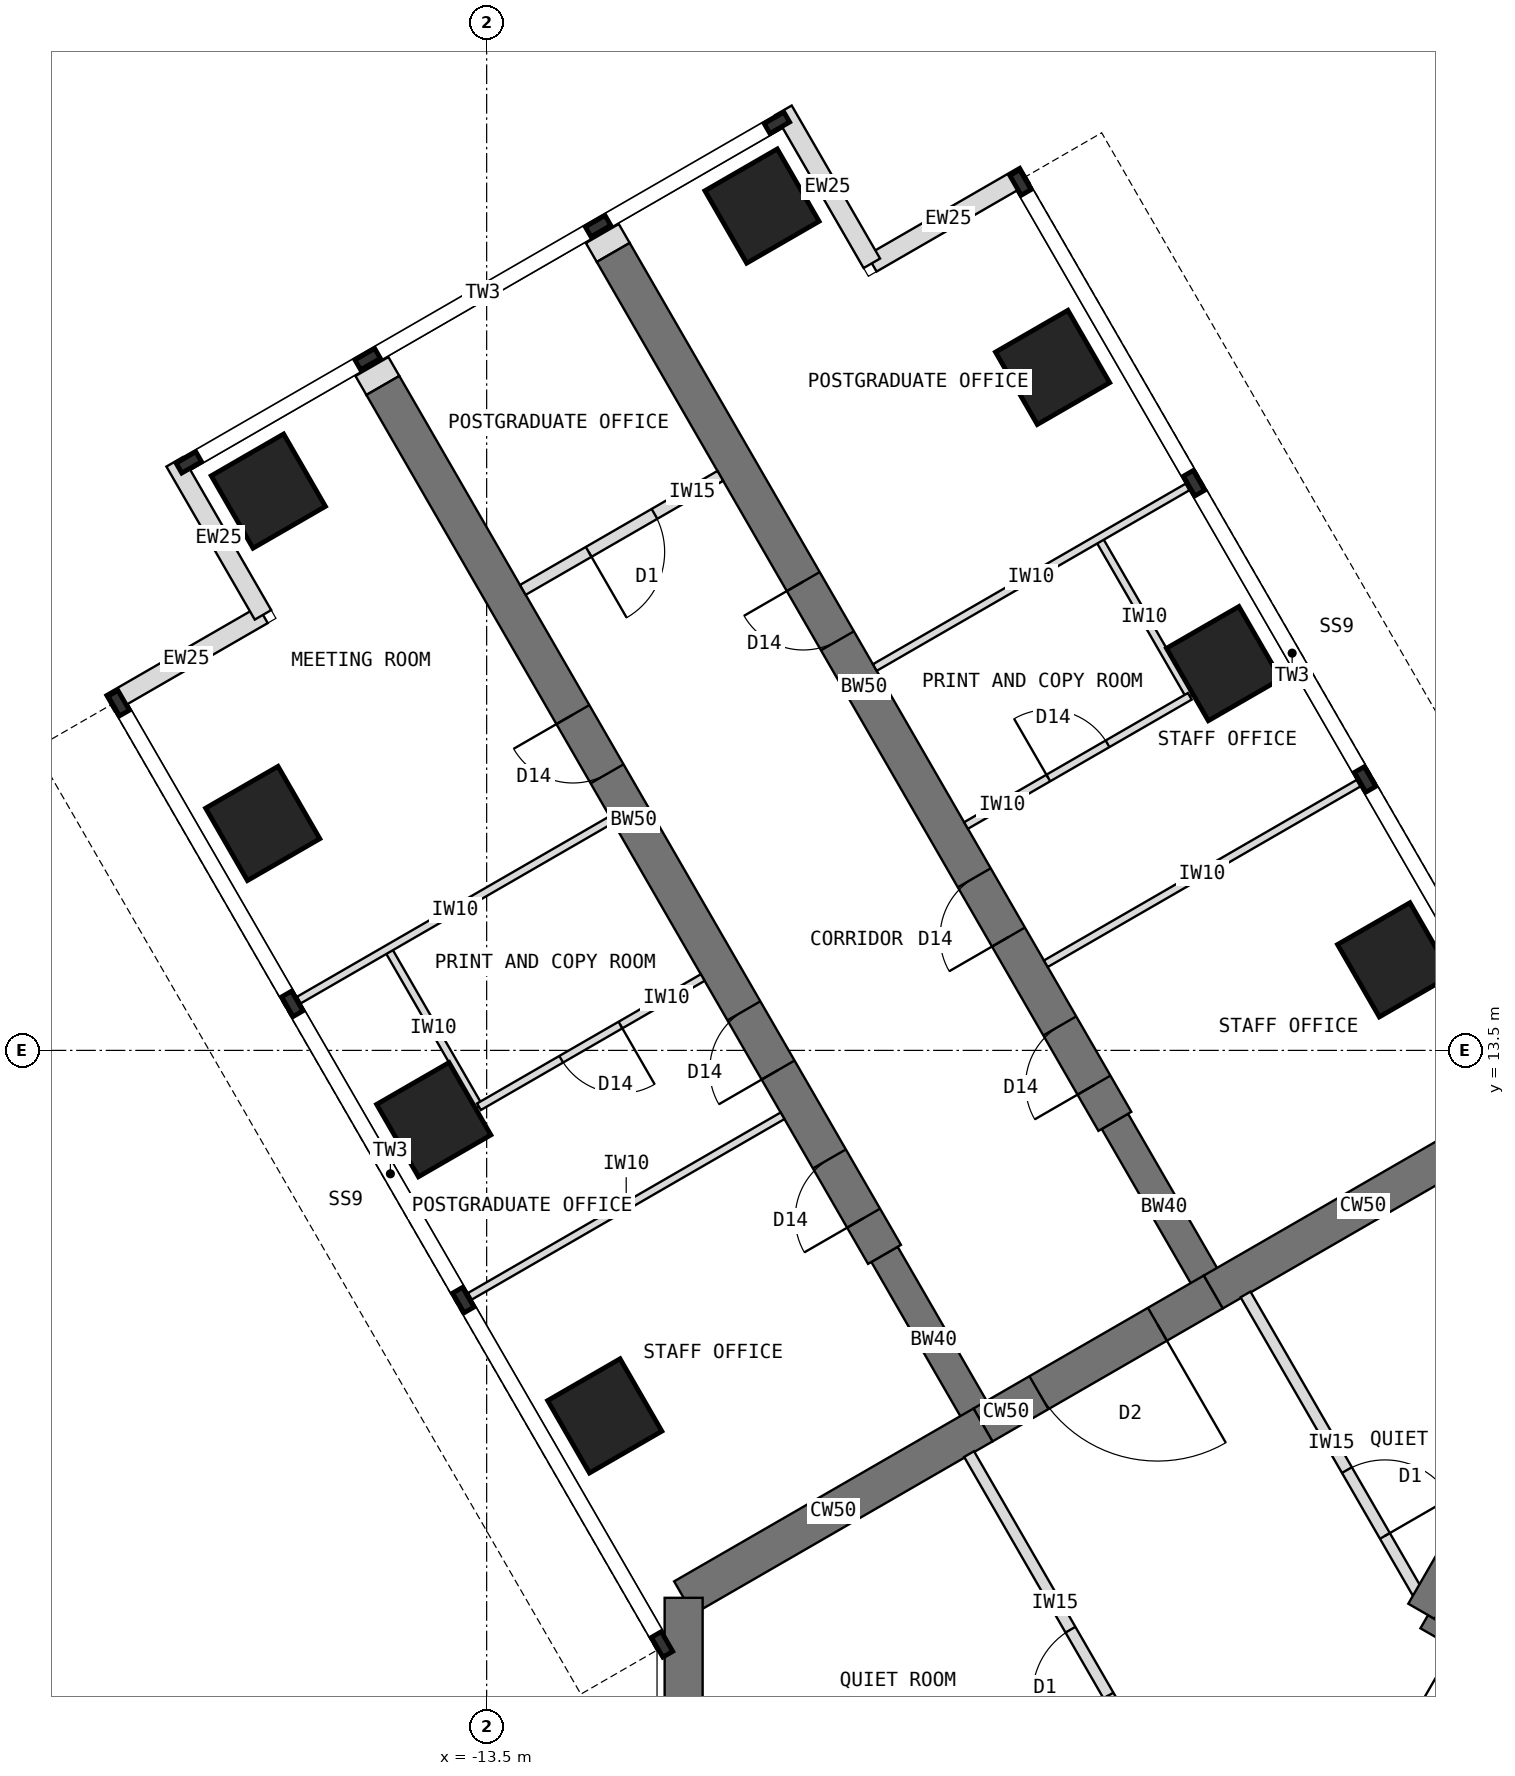
"""IFC4 building model, lengths in metres.
Left out: names, types, materials, properties, quantities, classifications, styles, units other than length and angle.
Written with IfcOpenShell. Run it as: python <this file> out.ifc"""

import sys

from ifc_helpers import new_model, si_unit, direction, frame, frame_2d, origin, origin_2d, place, context, subcontext, project, spatial, rectangle, extrude, element, fill, save


model = new_model("IFC4")
c1 = context("Model", 3, precision=1e-05, world=origin(), true_north=direction((0.0, 1.0)))
c2 = subcontext(c1, "Body", "Model", "MODEL_VIEW")
j1 = project(units=[si_unit("LENGTHUNIT", "METRE"), si_unit("PLANEANGLEUNIT", "RADIAN")], contexts=[c1])
p1 = place(None, origin())
s1 = spatial("IfcSite", under=j1, at=p1, CompositionType="ELEMENT")
p2 = place(p1, origin())
s2 = spatial("IfcBuilding", under=s1, at=p2, CompositionType="ELEMENT")
p3 = place(p2, frame((0.0, 0.0, 234.5)))
s3 = spatial("IfcBuildingStorey", under=s2, at=p3, CompositionType="ELEMENT", Elevation=234.5)
p4 = place(p3, frame((0.0, 12.596, 0.0), z_axis=(0.0, 0.0, 1.0), x_axis=(-0.866011268655, -0.500024481964, 0.0)))
e1 = element("IfcWall", 1, at=p4, inside=s3, PredefinedType="SHEAR", context=c2, shape_type="SweptSolid", body=[
    extrude(rectangle(XDim=4.548, YDim=0.5, at=frame_2d((2.274, 0.0))), origin(), (0.0, 0.0, 1.0), 4.0),
])
p5 = place(p3, frame((-3.939, 10.322, 0.0), z_axis=(0.0, 0.0, 1.0), x_axis=(-0.866019471182, -0.500010275428, 0.0)))
e2 = element("IfcWall", 2, at=p5, inside=s3, PredefinedType="SHEAR", context=c2, shape_type="SweptSolid", body=[
    extrude(rectangle(XDim=3.5, YDim=0.5, at=frame_2d((1.75, 0.0))), origin(), (0.0, 0.0, 1.0), 4.0),
])
p6 = place(p5, frame((0.85, 0.0, 0.0)))
e3 = element("IfcOpeningElement", 3, at=p6, cuts=e2, PredefinedType="OPENING", context=c2, shape_type="SweptSolid", body=[
    extrude(rectangle(XDim=1.8, YDim=2.1, at=frame_2d((0.9, 1.05))), frame((0.0, 0.26, 0.0), z_axis=(0.0, -1.0, 0.0), x_axis=(1.0, 0.0, 0.0)), (0.0, 0.0, 1.0), 0.52),
])
p7 = place(p3, frame((-6.97, 8.572, 0.0), z_axis=(0.0, 0.0, 1.0), x_axis=(-0.866034513004, -0.499984222037, 0.0)))
e4 = element("IfcWall", 4, at=p7, inside=s3, PredefinedType="SHEAR", context=c2, shape_type="SweptSolid", body=[
    extrude(rectangle(XDim=4.548, YDim=0.5, at=frame_2d((2.274, 0.0))), origin(), (0.0, 0.0, 1.0), 4.0),
])
p8 = place(p3, frame((-10.908, 6.298, 0.0), z_axis=(0.0, 0.0, 1.0), x_axis=(0.0, -1.0, 0.0)))
e5 = element("IfcWall", 5, at=p8, inside=s3, PredefinedType="SHEAR", context=c2, shape_type="SweptSolid", body=[
    extrude(rectangle(XDim=12.596, YDim=0.5, at=frame_2d((6.298, 0.0))), origin(), (0.0, 0.0, 1.0), 4.0),
])
p9 = place(p3, frame((-6.97, 8.572, 0.0), z_axis=(0.0, 0.0, 1.0), x_axis=(-0.499988811324, 0.866031863473, 0.0)))
e6 = element("IfcWall", 6, at=p9, inside=s3, PredefinedType="SHEAR", context=c2, shape_type="SweptSolid", body=[
    extrude(rectangle(XDim=2.592, YDim=0.4, at=frame_2d((1.296, 0.0))), origin(), (0.0, 0.0, 1.0), 4.0),
])
p10 = place(p3, frame((-8.266, 10.816, 0.0), z_axis=(0.0, 0.0, 1.0), x_axis=(-0.499996231654, 0.866027579429, 0.0)))
e7 = element("IfcWall", 7, at=p10, inside=s3, PredefinedType="SHEAR", context=c2, shape_type="SweptSolid", body=[
    extrude(rectangle(XDim=13.2, YDim=0.5, at=frame_2d((6.6, 0.0))), origin(), (0.0, 0.0, 1.0), 4.0),
])
p11 = place(p10, frame((0.55, 0.0, 0.0)))
e8 = element("IfcOpeningElement", 8, at=p11, cuts=e7, PredefinedType="OPENING", context=c2, shape_type="SweptSolid", body=[
    extrude(rectangle(XDim=0.9, YDim=2.1, at=frame_2d((0.45, 1.05))), frame((0.0, 0.26, 0.0), z_axis=(0.0, -1.0, 0.0), x_axis=(1.0, 0.0, 0.0)), (0.0, 0.0, 1.0), 0.52),
])
p12 = place(p10, frame((2.8, 0.0, 0.0)))
e9 = element("IfcOpeningElement", 9, at=p12, cuts=e7, PredefinedType="OPENING", context=c2, shape_type="SweptSolid", body=[
    extrude(rectangle(XDim=0.9, YDim=2.1, at=frame_2d((0.45, 1.05))), frame((0.0, 0.26, 0.0), z_axis=(0.0, -1.0, 0.0), x_axis=(1.0, 0.0, 0.0)), (0.0, 0.0, 1.0), 0.52),
])
p13 = place(p10, frame((7.3, 0.0, 0.0)))
e10 = element("IfcOpeningElement", 10, at=p13, cuts=e7, PredefinedType="OPENING", context=c2, shape_type="SweptSolid", body=[
    extrude(rectangle(XDim=0.9, YDim=2.1, at=frame_2d((0.45, 1.05))), frame((0.0, 0.26, 0.0), z_axis=(0.0, -1.0, 0.0), x_axis=(1.0, 0.0, 0.0)), (0.0, 0.0, 1.0), 0.52),
])
p14 = place(p3, frame((-3.939, 10.322, 0.0), z_axis=(0.0, 0.0, 1.0), x_axis=(-0.499918158782, 0.866072649678, 0.0)))
e11 = element("IfcWall", 11, at=p14, inside=s3, PredefinedType="SHEAR", context=c2, shape_type="SweptSolid", body=[
    extrude(rectangle(XDim=2.592, YDim=0.4, at=frame_2d((1.296, 0.0))), origin(), (0.0, 0.0, 1.0), 4.0),
])
p15 = place(p3, frame((-5.234, 12.566, 0.0), z_axis=(0.0, 0.0, 1.0), x_axis=(-0.500010103361, 0.866019570528, 0.0)))
e12 = element("IfcWall", 12, at=p15, inside=s3, PredefinedType="SHEAR", context=c2, shape_type="SweptSolid", body=[
    extrude(rectangle(XDim=13.2, YDim=0.5, at=frame_2d((6.6, 0.0))), origin(), (0.0, 0.0, 1.0), 4.0),
])
p16 = place(p15, frame((0.55, 0.0, 0.0)))
e13 = element("IfcOpeningElement", 13, at=p16, cuts=e12, PredefinedType="OPENING", context=c2, shape_type="SweptSolid", body=[
    extrude(rectangle(XDim=0.9, YDim=2.1, at=frame_2d((0.45, 1.05))), frame((0.0, 0.26, 0.0), z_axis=(0.0, -1.0, 0.0), x_axis=(1.0, 0.0, 0.0)), (0.0, 0.0, 1.0), 0.52),
])
p17 = place(p15, frame((2.8, 0.0, 0.0)))
e14 = element("IfcOpeningElement", 14, at=p17, cuts=e12, PredefinedType="OPENING", context=c2, shape_type="SweptSolid", body=[
    extrude(rectangle(XDim=0.9, YDim=2.1, at=frame_2d((0.45, 1.05))), frame((0.0, 0.26, 0.0), z_axis=(0.0, -1.0, 0.0), x_axis=(1.0, 0.0, 0.0)), (0.0, 0.0, 1.0), 0.52),
])
p18 = place(p15, frame((7.3, 0.0, 0.0)))
e15 = element("IfcOpeningElement", 15, at=p18, cuts=e12, PredefinedType="OPENING", context=c2, shape_type="SweptSolid", body=[
    extrude(rectangle(XDim=0.9, YDim=2.1, at=frame_2d((0.45, 1.05))), frame((0.0, 0.26, 0.0), z_axis=(0.0, -1.0, 0.0), x_axis=(1.0, 0.0, 0.0)), (0.0, 0.0, 1.0), 0.52),
])
for number, where, z_axis, x_axis in (
    (16, (-11.946, 8.691, 0.0), (0.0, 0.0, 1.0), (0.866, 0.5, 0.0)),
    (17, (-1.554, 14.691, 0.0), (0.0, 0.0, 1.0), (0.866, 0.5, 0.0)),
    (18, (-14.196, 12.588, 0.0), (0.0, 0.0, 1.0), (0.866, 0.5, 0.0)),
    (19, (-3.804, 18.588, 0.0), (0.0, 0.0, 1.0), (0.866, 0.5, 0.0)),
    (20, (-16.446, 16.486, 0.0), (0.0, 0.0, 1.0), (0.866, 0.5, 0.0)),
    (21, (-6.054, 22.486, 0.0), (0.0, 0.0, 1.0), (0.866, 0.5, 0.0)),
    (22, (-16.373, 20.858, 0.0), (0.0, 0.0, 1.0), (0.866, 0.5, 0.0)),
    (23, (-9.877, 24.608, 0.0), (0.0, 0.0, 1.0), (0.866, 0.5, 0.0)),
):
    element("IfcColumn", number, at=place(p3, frame(where, z_axis=z_axis, x_axis=x_axis)), inside=s3, PredefinedType="COLUMN", context=c2, shape_type="SweptSolid", body=[
        extrude(rectangle(XDim=1.1, YDim=1.1, at=origin_2d()), origin(), (0.0, 0.0, 1.0), 4.0),
    ])
for number, where, z_axis, x_axis in (
    (24, (-18.456, 18.067, 0.0), (0.0, 0.0, 1.0), (0.866, 0.5, 0.0)),
    (25, (-16.443, 19.23, 0.0), (0.0, 0.0, 1.0), (-0.5, 0.866, 0.0)),
    (26, (-6.419, 25.017, 0.0), (0.0, 0.0, 1.0), (-0.866, -0.5, 0.0)),
    (27, (-8.432, 23.855, 0.0), (0.0, 0.0, 1.0), (-0.5, 0.866, 0.0)),
):
    element("IfcWall", number, at=place(p3, frame(where, z_axis=z_axis, x_axis=x_axis)), inside=s3, PredefinedType="STANDARD", context=c2, shape_type="SweptSolid", body=[
        extrude(rectangle(XDim=2.325, YDim=0.25, at=frame_2d((1.163, 0.0))), origin(), (0.0, 0.0, 1.0), 3.7),
    ])
for number, where, z_axis, x_axis in (
    (28, (-14.865, 22.248, 0.0), (0.0, 0.0, 1.0), (-0.5, 0.866, 0.0)),
    (29, (-11.834, 23.998, 0.0), (0.0, 0.0, 1.0), (-0.5, 0.866, 0.0)),
):
    element("IfcWall", number, at=place(p3, frame(where, z_axis=z_axis, x_axis=x_axis)), inside=s3, PredefinedType="PARTITIONING", context=c2, shape_type="SweptSolid", body=[
        extrude(rectangle(XDim=0.288, YDim=0.5, at=frame_2d((0.144, 0.0))), origin(), (0.0, 0.0, 1.0), 3.7),
    ])
p19 = place(p3, frame((5.764, 1.984, 0.0), z_axis=(0.0, 0.0, 1.0), x_axis=(-0.866026010844, 0.49999894854, 0.0)))
e30 = element("IfcWall", 30, at=p19, inside=s3, PredefinedType="SHEAR", context=c2, shape_type="SweptSolid", body=[
    extrude(rectangle(XDim=8.0, YDim=0.2, at=frame_2d((4.0, 0.0))), origin(), (0.0, 0.0, 1.0), 4.0),
])
p20 = place(p19, frame((6.3, 0.0, 0.0)))
e31 = element("IfcOpeningElement", 31, at=p20, cuts=e30, PredefinedType="OPENING", context=c2, shape_type="SweptSolid", body=[
    extrude(rectangle(XDim=1.2, YDim=2.1, at=frame_2d((0.6, 1.05))), frame((0.0, 0.11, 0.0), z_axis=(0.0, -1.0, 0.0), x_axis=(1.0, 0.0, 0.0)), (0.0, 0.0, 1.0), 0.22),
])
p21 = place(p3, frame((-1.201, 6.12, 0.0), z_axis=(0.0, 0.0, 1.0), x_axis=(0.500021575205, 0.866012946976, 0.0)))
e32 = element("IfcWall", 32, at=p21, inside=s3, PredefinedType="SHEAR", context=c2, shape_type="SweptSolid", body=[
    extrude(rectangle(XDim=5.958, YDim=0.4, at=frame_2d((2.979, 0.0))), origin(), (0.0, 0.0, 1.0), 4.0),
])
for number, where, z_axis, x_axis in (
    (33, (-9.607, 12.64, 0.0), (0.0, 0.0, 1.0), (-0.866, -0.5, 0.0)),
    (34, (-11.857, 16.537, 0.0), (0.0, 0.0, 1.0), (-0.866, -0.5, 0.0)),
):
    element("IfcWall", number, at=place(p3, frame(where, z_axis=z_axis, x_axis=x_axis)), inside=s3, PredefinedType="PARTITIONING", context=c2, shape_type="SweptSolid", body=[
        extrude(rectangle(XDim=4.75, YDim=0.1, at=frame_2d((2.375, 0.0))), origin(), (0.0, 0.0, 1.0), 3.7),
    ])
p22 = place(p3, frame((-13.602, 12.759, 0.0), z_axis=(0.0, 0.0, 1.0), x_axis=(-0.500001309137, 0.866024647952, 0.0)))
e35 = element("IfcWall", 35, at=p22, inside=s3, PredefinedType="PARTITIONING", context=c2, shape_type="SweptSolid", body=[
    extrude(rectangle(XDim=2.4, YDim=0.1, at=frame_2d((1.2, 0.0))), origin(), (0.0, 0.0, 1.0), 3.7),
])
p23 = place(p3, frame((-10.657, 14.458, 0.0), z_axis=(0.0, 0.0, 1.0), x_axis=(-0.866038511948, -0.499977295307, 0.0)))
e36 = element("IfcWall", 36, at=p23, inside=s3, PredefinedType="PARTITIONING", context=c2, shape_type="SweptSolid", body=[
    extrude(rectangle(XDim=3.4, YDim=0.1, at=frame_2d((1.7, 0.0))), origin(), (0.0, 0.0, 1.0), 3.7),
])
p24 = place(p23, frame((1.25, 0.0, 0.0)))
e37 = element("IfcOpeningElement", 37, at=p24, cuts=e36, PredefinedType="OPENING", context=c2, shape_type="SweptSolid", body=[
    extrude(rectangle(XDim=0.9, YDim=2.1, at=frame_2d((0.45, 1.05))), frame((0.0, 0.06, 0.0), z_axis=(0.0, -1.0, 0.0), x_axis=(1.0, 0.0, 0.0)), (0.0, 0.0, 1.0), 0.12),
])
for number, where, z_axis, x_axis in (
    (38, (-6.143, 14.64, 0.0), (0.0, 0.0, 1.0), (0.866, 0.5, 0.0)),
    (39, (-8.393, 18.537, 0.0), (0.0, 0.0, 1.0), (0.866, 0.5, 0.0)),
):
    element("IfcWall", number, at=place(p3, frame(where, z_axis=z_axis, x_axis=x_axis)), inside=s3, PredefinedType="PARTITIONING", context=c2, shape_type="SweptSolid", body=[
        extrude(rectangle(XDim=4.75, YDim=0.1, at=frame_2d((2.375, 0.0))), origin(), (0.0, 0.0, 1.0), 3.7),
    ])
p25 = place(p3, frame((-4.249, 18.158, 0.0), z_axis=(0.0, 0.0, 1.0), x_axis=(-0.499957262057, 0.866050077142, 0.0)))
e40 = element("IfcWall", 40, at=p25, inside=s3, PredefinedType="PARTITIONING", context=c2, shape_type="SweptSolid", body=[
    extrude(rectangle(XDim=2.4, YDim=0.1, at=frame_2d((1.2, 0.0))), origin(), (0.0, 0.0, 1.0), 3.7),
])
p26 = place(p3, frame((-7.193, 16.458, 0.0), z_axis=(0.0, 0.0, 1.0), x_axis=(0.866020560687, 0.500008388397, 0.0)))
e41 = element("IfcWall", 41, at=p26, inside=s3, PredefinedType="PARTITIONING", context=c2, shape_type="SweptSolid", body=[
    extrude(rectangle(XDim=3.4, YDim=0.1, at=frame_2d((1.7, 0.0))), origin(), (0.0, 0.0, 1.0), 3.7),
])
p27 = place(p26, frame((1.25, 0.0, 0.0)))
e42 = element("IfcOpeningElement", 42, at=p27, cuts=e41, PredefinedType="OPENING", context=c2, shape_type="SweptSolid", body=[
    extrude(rectangle(XDim=0.9, YDim=2.1, at=frame_2d((0.45, 1.05))), frame((0.0, 0.06, 0.0), z_axis=(0.0, -1.0, 0.0), x_axis=(1.0, 0.0, 0.0)), (0.0, 0.0, 1.0), 0.12),
])
p28 = place(p3, frame((-4.89, 4.27, 0.0), z_axis=(0.0, 0.0, 1.0), x_axis=(-0.500032211057, 0.866006805923, 0.0)))
e43 = element("IfcWall", 43, at=p28, inside=s3, PredefinedType="PARTITIONING", context=c2, shape_type="SweptSolid", body=[
    extrude(rectangle(XDim=4.526, YDim=0.15, at=frame_2d((2.263, 0.0))), origin(), (0.0, 0.0, 1.0), 3.7),
])
p29 = place(p28, frame((0.858, 0.0, 0.0)))
e44 = element("IfcOpeningElement", 44, at=p29, cuts=e43, PredefinedType="OPENING", context=c2, shape_type="SweptSolid", body=[
    extrude(rectangle(XDim=1.0, YDim=2.1, at=frame_2d((0.5, 1.05))), frame((0.0, 0.085, 0.0), z_axis=(0.0, -1.0, 0.0), x_axis=(1.0, 0.0, 0.0)), (0.0, 0.0, 1.0), 0.17),
])
p30 = place(p3, frame((-3.515, 10.289, 0.0), z_axis=(0.0, 0.0, 1.0), x_axis=(0.499968392031, -0.866043651885, 0.0)))
e45 = element("IfcWall", 45, at=p30, inside=s3, PredefinedType="PARTITIONING", context=c2, shape_type="SweptSolid", body=[
    extrude(rectangle(XDim=4.526, YDim=0.15, at=frame_2d((2.263, 0.0))), origin(), (0.0, 0.0, 1.0), 3.7),
])
p31 = place(p30, frame((2.668, 0.0, 0.0)))
e46 = element("IfcOpeningElement", 46, at=p31, cuts=e45, PredefinedType="OPENING", context=c2, shape_type="SweptSolid", body=[
    extrude(rectangle(XDim=1.0, YDim=2.1, at=frame_2d((0.5, 1.05))), frame((0.0, 0.085, 0.0), z_axis=(0.0, -1.0, 0.0), x_axis=(1.0, 0.0, 0.0)), (0.0, 0.0, 1.0), 0.17),
])
p32 = place(p3, frame((-10.426, 21.058, 0.0), z_axis=(0.0, 0.0, 1.0), x_axis=(-0.866010750942, -0.50002537861, 0.0)))
e47 = element("IfcWall", 47, at=p32, inside=s3, PredefinedType="PARTITIONING", context=c2, shape_type="SweptSolid", body=[
    extrude(rectangle(XDim=3.0, YDim=0.15, at=frame_2d((1.5, 0.0))), origin(), (0.0, 0.0, 1.0), 3.7),
])
p33 = place(p32, frame((1.0, 0.0, 0.0)))
e48 = element("IfcOpeningElement", 48, at=p33, cuts=e47, PredefinedType="OPENING", context=c2, shape_type="SweptSolid", body=[
    extrude(rectangle(XDim=1.0, YDim=2.1, at=frame_2d((0.5, 1.05))), frame((0.0, 0.085, 0.0), z_axis=(0.0, -1.0, 0.0), x_axis=(1.0, 0.0, 0.0)), (0.0, 0.0, 1.0), 0.17),
])
p34 = place(p6, origin())
e49 = element("IfcDoor", 49, at=p34, inside=s3, OperationType="DOUBLE_DOOR_DOUBLE_SWING", PredefinedType="DOOR", context=c2, shape_type="SweptSolid", body=[
    extrude(rectangle(XDim=1.8, YDim=2.1, at=frame_2d((0.9, 1.05))), frame((0.0, 0.025, 0.0), z_axis=(0.0, -1.0, 0.0), x_axis=(1.0, 0.0, 0.0)), (0.0, 0.0, 1.0), 0.05),
])
fill(e3, e49)
p35 = place(p24, origin())
e50 = element("IfcDoor", 50, at=p35, inside=s3, OperationType="SINGLE_SWING_LEFT", PredefinedType="DOOR", context=c2, shape_type="SweptSolid", body=[
    extrude(rectangle(XDim=0.9, YDim=2.1, at=frame_2d((0.45, 1.05))), frame((0.0, 0.025, 0.0), z_axis=(0.0, -1.0, 0.0), x_axis=(1.0, 0.0, 0.0)), (0.0, 0.0, 1.0), 0.05),
])
fill(e37, e50)
p36 = place(p27, origin())
e51 = element("IfcDoor", 51, at=p36, inside=s3, OperationType="SINGLE_SWING_LEFT", PredefinedType="DOOR", context=c2, shape_type="SweptSolid", body=[
    extrude(rectangle(XDim=0.9, YDim=2.1, at=frame_2d((0.45, 1.05))), frame((0.0, 0.025, 0.0), z_axis=(0.0, -1.0, 0.0), x_axis=(1.0, 0.0, 0.0)), (0.0, 0.0, 1.0), 0.05),
])
fill(e42, e51)
p37 = place(p31, origin())
e52 = element("IfcDoor", 52, at=p37, inside=s3, OperationType="SINGLE_SWING_RIGHT", PredefinedType="DOOR", context=c2, shape_type="SweptSolid", body=[
    extrude(rectangle(XDim=1.0, YDim=2.1, at=frame_2d((0.5, 1.05))), frame((0.0, 0.025, 0.0), z_axis=(0.0, -1.0, 0.0), x_axis=(1.0, 0.0, 0.0)), (0.0, 0.0, 1.0), 0.05),
])
fill(e46, e52)
p38 = place(p29, origin())
e53 = element("IfcDoor", 53, at=p38, inside=s3, OperationType="SINGLE_SWING_LEFT", PredefinedType="DOOR", context=c2, shape_type="SweptSolid", body=[
    extrude(rectangle(XDim=1.0, YDim=2.1, at=frame_2d((0.5, 1.05))), frame((0.0, 0.025, 0.0), z_axis=(0.0, -1.0, 0.0), x_axis=(1.0, 0.0, 0.0)), (0.0, 0.0, 1.0), 0.05),
])
fill(e44, e53)
p39 = place(p33, origin())
e54 = element("IfcDoor", 54, at=p39, inside=s3, OperationType="SINGLE_SWING_RIGHT", PredefinedType="DOOR", context=c2, shape_type="SweptSolid", body=[
    extrude(rectangle(XDim=1.0, YDim=2.1, at=frame_2d((0.5, 1.05))), frame((0.0, 0.025, 0.0), z_axis=(0.0, -1.0, 0.0), x_axis=(1.0, 0.0, 0.0)), (0.0, 0.0, 1.0), 0.05),
])
fill(e48, e54)
p40 = place(p11, origin())
e55 = element("IfcDoor", 55, at=p40, inside=s3, OperationType="SINGLE_SWING_LEFT", PredefinedType="DOOR", context=c2, shape_type="SweptSolid", body=[
    extrude(rectangle(XDim=0.9, YDim=2.1, at=frame_2d((0.45, 1.05))), frame((0.0, 0.025, 0.0), z_axis=(0.0, -1.0, 0.0), x_axis=(1.0, 0.0, 0.0)), (0.0, 0.0, 1.0), 0.05),
])
fill(e8, e55)
p41 = place(p12, origin())
e56 = element("IfcDoor", 56, at=p41, inside=s3, OperationType="SINGLE_SWING_LEFT", PredefinedType="DOOR", context=c2, shape_type="SweptSolid", body=[
    extrude(rectangle(XDim=0.9, YDim=2.1, at=frame_2d((0.45, 1.05))), frame((0.0, 0.025, 0.0), z_axis=(0.0, -1.0, 0.0), x_axis=(1.0, 0.0, 0.0)), (0.0, 0.0, 1.0), 0.05),
])
fill(e9, e56)
p42 = place(p13, origin())
e57 = element("IfcDoor", 57, at=p42, inside=s3, OperationType="SINGLE_SWING_RIGHT", PredefinedType="DOOR", context=c2, shape_type="SweptSolid", body=[
    extrude(rectangle(XDim=0.9, YDim=2.1, at=frame_2d((0.45, 1.05))), frame((0.0, 0.025, 0.0), z_axis=(0.0, -1.0, 0.0), x_axis=(1.0, 0.0, 0.0)), (0.0, 0.0, 1.0), 0.05),
])
fill(e10, e57)
p43 = place(p16, origin())
e58 = element("IfcDoor", 58, at=p43, inside=s3, OperationType="SINGLE_SWING_LEFT", PredefinedType="DOOR", context=c2, shape_type="SweptSolid", body=[
    extrude(rectangle(XDim=0.9, YDim=2.1, at=frame_2d((0.45, 1.05))), frame((0.0, 0.025, 0.0), z_axis=(0.0, -1.0, 0.0), x_axis=(1.0, 0.0, 0.0)), (0.0, 0.0, 1.0), 0.05),
])
fill(e13, e58)
p44 = place(p17, origin())
e59 = element("IfcDoor", 59, at=p44, inside=s3, OperationType="SINGLE_SWING_LEFT", PredefinedType="DOOR", context=c2, shape_type="SweptSolid", body=[
    extrude(rectangle(XDim=0.9, YDim=2.1, at=frame_2d((0.45, 1.05))), frame((0.0, 0.025, 0.0), z_axis=(0.0, -1.0, 0.0), x_axis=(1.0, 0.0, 0.0)), (0.0, 0.0, 1.0), 0.05),
])
fill(e14, e59)
p45 = place(p18, origin())
e60 = element("IfcDoor", 60, at=p45, inside=s3, OperationType="SINGLE_SWING_RIGHT", PredefinedType="DOOR", context=c2, shape_type="SweptSolid", body=[
    extrude(rectangle(XDim=0.9, YDim=2.1, at=frame_2d((0.45, 1.05))), frame((0.0, 0.025, 0.0), z_axis=(0.0, -1.0, 0.0), x_axis=(1.0, 0.0, 0.0)), (0.0, 0.0, 1.0), 0.05),
])
fill(e15, e60)
save(model, sys.argv[1])
